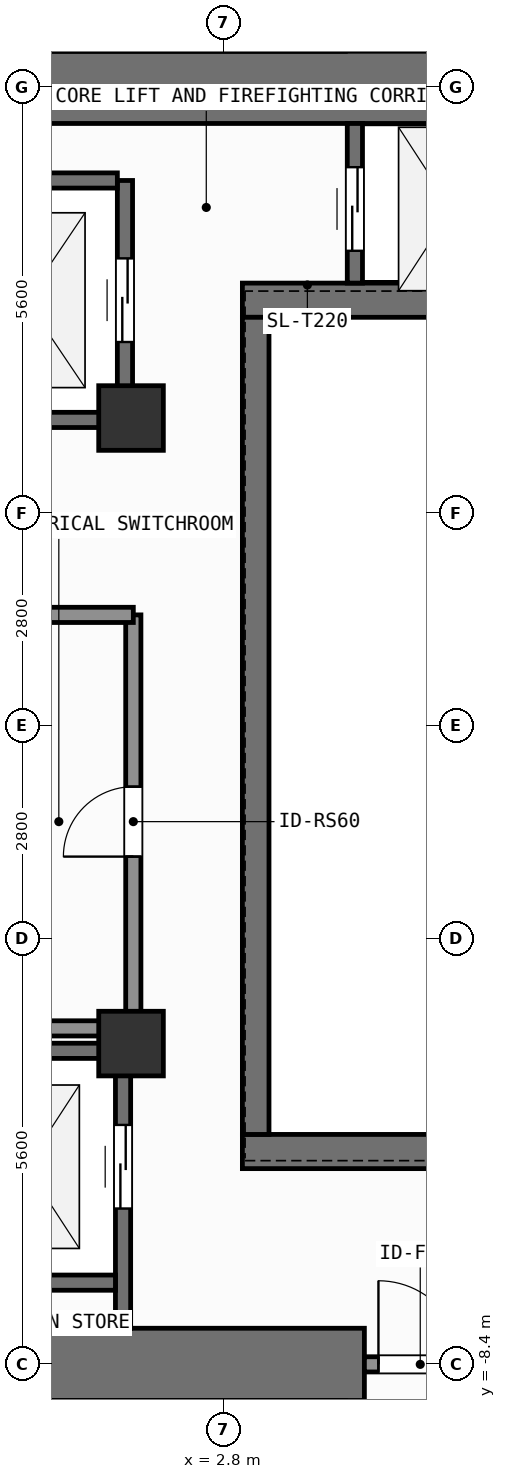
"""IFC4 building model, lengths in metres.
Left out: names, types, materials, properties, quantities, classifications, styles, units other than length and angle.
Written with IfcOpenShell. Run it as: python <this file> out.ifc"""

import sys

from ifc_helpers import new_model, si_unit, direction, frame, frame_2d, origin, origin_2d, place, context, subcontext, project, spatial, rectangle, extrude, element, fill, save


model = new_model("IFC4")
c1 = context("Model", 3, precision=1e-05, world=origin(), true_north=direction((0.0, 1.0)))
c2 = subcontext(c1, "Body", "Model", "MODEL_VIEW")
j1 = project(units=[si_unit("LENGTHUNIT", "METRE"), si_unit("PLANEANGLEUNIT", "RADIAN")], contexts=[c1])
p1 = place(None, origin())
s1 = spatial("IfcSite", under=j1, at=p1, CompositionType="ELEMENT")
p2 = place(p1, origin())
s2 = spatial("IfcBuilding", under=s1, at=p2, CompositionType="ELEMENT")
p3 = place(p2, frame((0.0, 0.0, 121.2)))
s3 = spatial("IfcBuildingStorey", under=s2, at=p3, CompositionType="ELEMENT", Elevation=121.2)
p4 = place(p3, frame((-2.62, -8.4, 0.0), z_axis=(0.0, 0.0, 1.0), x_axis=(1.0, 0.0, 0.0)))
e1 = element("IfcWall", 1, at=p4, inside=s3, PredefinedType="SHEAR", context=c2, shape_type="SweptSolid", body=[
    extrude(rectangle(XDim=7.27, YDim=0.95, at=frame_2d((3.635, 0.0))), origin(), (0.0, 0.0, 1.0), 3.9),
])
p5 = place(p3, frame((-7.55, 8.4, 0.0), z_axis=(0.0, 0.0, 1.0), x_axis=(1.0, 0.0, 0.0)))
e2 = element("IfcWall", 2, at=p5, inside=s3, PredefinedType="SHEAR", context=c2, shape_type="SweptSolid", body=[
    extrude(rectangle(XDim=16.425, YDim=0.95, at=frame_2d((8.212, 0.0))), origin(), (0.0, 0.0, 1.0), 3.9),
])
for number, where, z_axis, x_axis in (
    (3, (3.045, -5.6, 0.0), (0.0, 0.0, 1.0), (1.0, 0.0, 0.0)),
    (4, (3.045, 5.6, 0.0), (0.0, 0.0, 1.0), (1.0, 0.0, 0.0)),
):
    element("IfcWall", number, at=place(p3, frame(where, z_axis=z_axis, x_axis=x_axis)), inside=s3, PredefinedType="SHEAR", context=c2, shape_type="SweptSolid", body=[
        extrude(rectangle(XDim=5.83, YDim=0.45, at=frame_2d((2.915, 0.0))), origin(), (0.0, 0.0, 1.0), 3.9),
    ])
p6 = place(p3, frame((3.22, -5.375, 0.0), z_axis=(0.0, 0.0, 1.0), x_axis=(0.0, 1.0, 0.0)))
e5 = element("IfcWall", 5, at=p6, inside=s3, PredefinedType="SHEAR", context=c2, shape_type="SweptSolid", body=[
    extrude(rectangle(XDim=10.75, YDim=0.35, at=frame_2d((5.375, 0.0))), origin(), (0.0, 0.0, 1.0), 3.9),
])
for number, where, z_axis, x_axis in (
    (6, (1.58, -4.18, 0.0), (0.0, 0.0, 1.0), (1.0, 0.0, 0.0)),
    (7, (1.58, 4.05, 0.0), (0.0, 0.0, 1.0), (1.0, 0.0, 0.0)),
):
    element("IfcColumn", number, at=place(p3, frame(where, z_axis=z_axis, x_axis=x_axis)), inside=s3, PredefinedType="COLUMN", context=c2, shape_type="SweptSolid", body=[
        extrude(rectangle(XDim=0.85, YDim=0.85, at=origin_2d()), origin(), (0.0, 0.0, 1.0), 3.9),
    ])
p7 = place(p3, frame((1.5, 4.025, 0.0), z_axis=(0.0, 0.0, 1.0), x_axis=(0.0, 1.0, 0.0)))
e8 = element("IfcWall", 8, at=p7, inside=s3, PredefinedType="SHEAR", context=c2, shape_type="SweptSolid", body=[
    extrude(rectangle(XDim=3.15, YDim=0.2, at=frame_2d((1.575, 0.0))), origin(), (0.0, 0.0, 1.0), 3.68),
])
p8 = place(p7, frame((1.025, 0.0, 0.0)))
e9 = element("IfcOpeningElement", 9, at=p8, cuts=e8, PredefinedType="OPENING", context=c2, shape_type="SweptSolid", body=[
    extrude(rectangle(XDim=1.1, YDim=2.2, at=frame_2d((0.55, 1.1))), frame((0.0, 0.11, 0.0), z_axis=(0.0, -1.0, 0.0), x_axis=(1.0, 0.0, 0.0)), (0.0, 0.0, 1.0), 0.22),
])
for number, where, z_axis, x_axis in (
    (10, (-1.0, 4.025, 0.0), (0.0, 0.0, 1.0), (1.0, 0.0, 0.0)),
    (11, (-1.0, 7.175, 0.0), (0.0, 0.0, 1.0), (1.0, 0.0, 0.0)),
):
    element("IfcWall", number, at=place(p3, frame(where, z_axis=z_axis, x_axis=x_axis)), inside=s3, PredefinedType="SHEAR", context=c2, shape_type="SweptSolid", body=[
        extrude(rectangle(XDim=2.4, YDim=0.2, at=frame_2d((1.2, 0.0))), origin(), (0.0, 0.0, 1.0), 3.68),
    ])
p9 = place(p3, frame((1.475, -7.925, 0.0), z_axis=(0.0, 0.0, 1.0), x_axis=(0.0, 1.0, 0.0)))
e12 = element("IfcWall", 12, at=p9, inside=s3, PredefinedType="SHEAR", context=c2, shape_type="SweptSolid", body=[
    extrude(rectangle(XDim=3.65, YDim=0.2, at=frame_2d((1.825, 0.0))), origin(), (0.0, 0.0, 1.0), 3.68),
])
p10 = place(p9, frame((1.575, 0.0, 0.0)))
e13 = element("IfcOpeningElement", 13, at=p10, cuts=e12, PredefinedType="OPENING", context=c2, shape_type="SweptSolid", body=[
    extrude(rectangle(XDim=1.1, YDim=2.2, at=frame_2d((0.55, 1.1))), frame((0.0, 0.11, 0.0), z_axis=(0.0, -1.0, 0.0), x_axis=(1.0, 0.0, 0.0)), (0.0, 0.0, 1.0), 0.22),
])
for number, where, z_axis, x_axis in (
    (14, (-0.975, -7.325, 0.0), (0.0, 0.0, 1.0), (1.0, 0.0, 0.0)),
    (15, (-0.975, -4.275, 0.0), (0.0, 0.0, 1.0), (1.0, 0.0, 0.0)),
):
    element("IfcWall", number, at=place(p3, frame(where, z_axis=z_axis, x_axis=x_axis)), inside=s3, PredefinedType="SHEAR", context=c2, shape_type="SweptSolid", body=[
        extrude(rectangle(XDim=2.35, YDim=0.2, at=frame_2d((1.175, 0.0))), origin(), (0.0, 0.0, 1.0), 3.68),
    ])
p11 = place(p3, frame((4.525, 5.825, 0.0), z_axis=(0.0, 0.0, 1.0), x_axis=(0.0, 1.0, 0.0)))
e16 = element("IfcWall", 16, at=p11, inside=s3, PredefinedType="SHEAR", context=c2, shape_type="SweptSolid", body=[
    extrude(rectangle(XDim=2.1, YDim=0.2, at=frame_2d((1.05, 0.0))), origin(), (0.0, 0.0, 1.0), 3.68),
])
p12 = place(p11, frame((0.425, 0.0, 0.0)))
e17 = element("IfcOpeningElement", 17, at=p12, cuts=e16, PredefinedType="OPENING", context=c2, shape_type="SweptSolid", body=[
    extrude(rectangle(XDim=1.1, YDim=2.2, at=frame_2d((0.55, 1.1))), frame((0.0, 0.11, 0.0), z_axis=(0.0, -1.0, 0.0), x_axis=(1.0, 0.0, 0.0)), (0.0, 0.0, 1.0), 0.22),
])
p13 = place(p3, frame((4.65, -8.4, 0.0), z_axis=(0.0, 0.0, 1.0), x_axis=(1.0, 0.0, 0.0)))
e18 = element("IfcWall", 18, at=p13, inside=s3, PredefinedType="SOLIDWALL", context=c2, shape_type="SweptSolid", body=[
    extrude(rectangle(XDim=1.47, YDim=0.2, at=frame_2d((0.735, 0.0))), origin(), (0.0, 0.0, 1.0), 2.72),
])
p14 = place(p13, frame((0.185, 0.0, 0.0)))
e19 = element("IfcOpeningElement", 19, at=p14, cuts=e18, PredefinedType="OPENING", context=c2, shape_type="SweptSolid", body=[
    extrude(rectangle(XDim=1.1, YDim=2.15, at=frame_2d((0.55, 1.075))), frame((0.0, 0.11, 0.0), z_axis=(0.0, -1.0, 0.0), x_axis=(1.0, 0.0, 0.0)), (0.0, 0.0, 1.0), 0.22),
])
p15 = place(p3, frame((1.61, -3.98, 0.0), z_axis=(0.0, 0.0, 1.0), x_axis=(0.0, 1.0, 0.0)))
e20 = element("IfcWall", 20, at=p15, inside=s3, PredefinedType="SOLIDWALL", context=c2, shape_type="SweptSolid", body=[
    extrude(rectangle(XDim=5.44, YDim=0.2, at=frame_2d((2.72, 0.0))), origin(), (0.0, 0.0, 1.0), 3.68),
])
p16 = place(p15, frame((2.26, 0.0, 0.0)))
e21 = element("IfcOpeningElement", 21, at=p16, cuts=e20, PredefinedType="OPENING", context=c2, shape_type="SweptSolid", body=[
    extrude(rectangle(XDim=0.92, YDim=2.1, at=frame_2d((0.46, 1.05))), frame((0.0, 0.11, 0.0), z_axis=(0.0, -1.0, 0.0), x_axis=(1.0, 0.0, 0.0)), (0.0, 0.0, 1.0), 0.22),
])
for number, where, z_axis, x_axis in (
    (22, (-1.58, -3.98, 0.0), (0.0, 0.0, 1.0), (1.0, 0.0, 0.0)),
    (23, (-1.58, 1.46, 0.0), (0.0, 0.0, 1.0), (1.0, 0.0, 0.0)),
):
    element("IfcWall", number, at=place(p3, frame(where, z_axis=z_axis, x_axis=x_axis)), inside=s3, PredefinedType="SOLIDWALL", context=c2, shape_type="SweptSolid", body=[
        extrude(rectangle(XDim=3.19, YDim=0.2, at=frame_2d((1.595, 0.0))), origin(), (0.0, 0.0, 1.0), 3.68),
    ])
p17 = place(p8, origin())
e24 = element("IfcDoor", 24, at=p17, inside=s3, OperationType="SLIDING_TO_LEFT", PredefinedType="DOOR", context=c2, shape_type="SweptSolid", body=[
    extrude(rectangle(XDim=1.1, YDim=2.2, at=frame_2d((0.55, 1.1))), frame((0.0, 0.025, 0.0), z_axis=(0.0, -1.0, 0.0), x_axis=(1.0, 0.0, 0.0)), (0.0, 0.0, 1.0), 0.05),
])
fill(e9, e24)
p18 = place(p10, origin())
e25 = element("IfcDoor", 25, at=p18, inside=s3, OperationType="SLIDING_TO_LEFT", PredefinedType="DOOR", context=c2, shape_type="SweptSolid", body=[
    extrude(rectangle(XDim=1.1, YDim=2.2, at=frame_2d((0.55, 1.1))), frame((0.0, 0.025, 0.0), z_axis=(0.0, -1.0, 0.0), x_axis=(1.0, 0.0, 0.0)), (0.0, 0.0, 1.0), 0.05),
])
fill(e13, e25)
p19 = place(p12, origin())
e26 = element("IfcDoor", 26, at=p19, inside=s3, OperationType="SLIDING_TO_LEFT", PredefinedType="DOOR", context=c2, shape_type="SweptSolid", body=[
    extrude(rectangle(XDim=1.1, YDim=2.2, at=frame_2d((0.55, 1.1))), frame((0.0, 0.025, 0.0), z_axis=(0.0, -1.0, 0.0), x_axis=(1.0, 0.0, 0.0)), (0.0, 0.0, 1.0), 0.05),
])
fill(e17, e26)
p20 = place(p14, origin())
e27 = element("IfcDoor", 27, at=p20, inside=s3, OperationType="SINGLE_SWING_LEFT", PredefinedType="DOOR", context=c2, shape_type="SweptSolid", body=[
    extrude(rectangle(XDim=1.1, YDim=2.15, at=frame_2d((0.55, 1.075))), frame((0.0, 0.025, 0.0), z_axis=(0.0, -1.0, 0.0), x_axis=(1.0, 0.0, 0.0)), (0.0, 0.0, 1.0), 0.05),
])
fill(e19, e27)
p21 = place(p16, origin())
e28 = element("IfcDoor", 28, at=p21, inside=s3, OperationType="SINGLE_SWING_LEFT", PredefinedType="DOOR", context=c2, shape_type="SweptSolid", body=[
    extrude(rectangle(XDim=0.92, YDim=2.1, at=frame_2d((0.46, 1.05))), frame((0.0, 0.025, 0.0), z_axis=(0.0, -1.0, 0.0), x_axis=(1.0, 0.0, 0.0)), (0.0, 0.0, 1.0), 0.05),
])
fill(e21, e28)
save(model, sys.argv[1])
